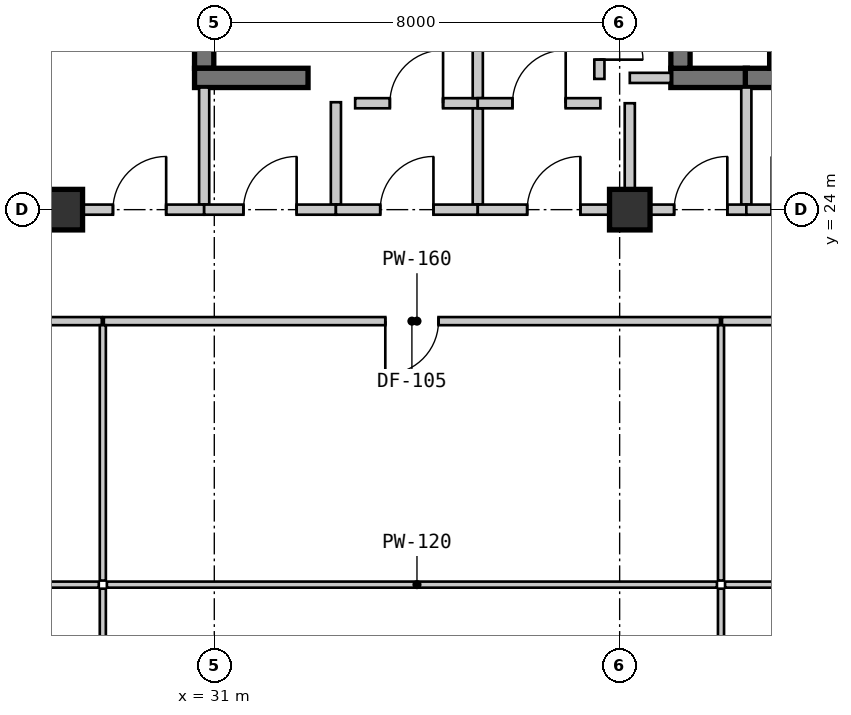
"""IFC4 building model, lengths in metres.
Left out: names, types, materials, properties, quantities, classifications, styles, units other than length and angle.
Written with IfcOpenShell. Run it as: python <this file> out.ifc"""

import sys

from ifc_helpers import new_model, si_unit, direction, frame, frame_2d, origin, origin_2d, place, context, subcontext, project, spatial, rectangle, extrude, source, transform, mapped, element, fill, save


model = new_model("IFC4")
c1 = context("Model", 3, precision=1e-05, world=origin(), true_north=direction((0.0, 1.0)))
c2 = subcontext(c1, "Body", "Model", "MODEL_VIEW")
j1 = project(units=[si_unit("LENGTHUNIT", "METRE"), si_unit("PLANEANGLEUNIT", "RADIAN")], contexts=[c1])
p1 = place(None, origin())
s1 = spatial("IfcSite", under=j1, at=p1, CompositionType="ELEMENT")
p2 = place(p1, origin())
s2 = spatial("IfcBuilding", under=s1, at=p2, CompositionType="ELEMENT")
p3 = place(p2, frame((0.0, 0.0, 45.15)))
s3 = spatial("IfcBuildingStorey", under=s2, at=p3, CompositionType="ELEMENT", Elevation=45.15)
m1 = source(origin(), c2, "Body", "SweptSolid", [
    extrude(rectangle(XDim=0.8, YDim=0.8, at=origin_2d()), origin(), (0.0, 0.0, 1.0), 3.15),
])
for number, where, z_axis, x_axis in (
    (1, (28.0, 24.0, 0.0), (0.0, 0.0, 1.0), (1.0, 0.0, 0.0)),
    (2, (39.2, 24.0, 0.0), (0.0, 0.0, 1.0), (1.0, 0.0, 0.0)),
):
    element("IfcColumn", number, at=place(p3, frame(where, z_axis=z_axis, x_axis=x_axis)), inside=s3, PredefinedType="COLUMN", context=c2, shape_type="MappedRepresentation", body=[
        mapped(m1, transform((0.0, 0.0, 0.0), scale=1.0)),
    ])
m2 = source(origin(), c2, "Body", "SweptSolid", [
    extrude(rectangle(XDim=1.22, YDim=0.38, at=frame_2d((0.61, 0.0))), origin(), (0.0, 0.0, 1.0), 2.93),
])
p4 = place(p3, frame((30.8, 28.01, 0.0), z_axis=(0.0, 0.0, 1.0), x_axis=(0.0, -1.0, 0.0)))
e3 = element("IfcWall", 3, at=p4, inside=s3, PredefinedType="SHEAR", context=c2, shape_type="MappedRepresentation", body=[
    mapped(m2, transform((0.0, 0.0, 0.0), scale=1.0)),
])
m3 = source(origin(), c2, "Body", "SweptSolid", [
    extrude(rectangle(XDim=2.24, YDim=0.38, at=frame_2d((1.12, 0.0))), origin(), (0.0, 0.0, 1.0), 2.93),
])
p5 = place(p3, frame((30.61, 26.6, 0.0), z_axis=(0.0, 0.0, 1.0), x_axis=(1.0, 0.0, 0.0)))
e4 = element("IfcWall", 4, at=p5, inside=s3, PredefinedType="SHEAR", context=c2, shape_type="MappedRepresentation", body=[
    mapped(m3, transform((0.0, 0.0, 0.0), scale=1.0)),
])
m4 = source(origin(), c2, "Body", "SweptSolid", [
    extrude(rectangle(XDim=1.51, YDim=0.38, at=frame_2d((0.755, 0.0))), origin(), (0.0, 0.0, 1.0), 2.93),
])
p6 = place(p3, frame((40.01, 26.6, 0.0), z_axis=(0.0, 0.0, 1.0), x_axis=(1.0, 0.0, 0.0)))
e5 = element("IfcWall", 5, at=p6, inside=s3, PredefinedType="SHEAR", context=c2, shape_type="MappedRepresentation", body=[
    mapped(m4, transform((0.0, 0.0, 0.0), scale=1.0)),
])
p7 = place(p3, frame((40.2, 28.01, 0.0), z_axis=(0.0, 0.0, 1.0), x_axis=(0.0, -1.0, 0.0)))
e6 = element("IfcWall", 6, at=p7, inside=s3, PredefinedType="SHEAR", context=c2, shape_type="MappedRepresentation", body=[
    mapped(m2, transform((0.0, 0.0, 0.0), scale=1.0)),
])
m5 = source(origin(), c2, "Body", "SweptSolid", [
    extrude(rectangle(XDim=0.86, YDim=0.38, at=frame_2d((0.43, 0.0))), origin(), (0.0, 0.0, 1.0), 2.93),
])
p8 = place(p3, frame((41.48, 26.6, 0.0), z_axis=(0.0, 0.0, 1.0), x_axis=(1.0, 0.0, 0.0)))
e7 = element("IfcWall", 7, at=p8, inside=s3, PredefinedType="SHEAR", context=c2, shape_type="MappedRepresentation", body=[
    mapped(m5, transform((0.0, 0.0, 0.0), scale=1.0)),
])
p9 = place(p3, frame((42.15, 26.79, 0.0), z_axis=(0.0, 0.0, 1.0), x_axis=(0.0, 1.0, 0.0)))
e8 = element("IfcWall", 8, at=p9, inside=s3, PredefinedType="SHEAR", context=c2, shape_type="MappedRepresentation", body=[
    mapped(m2, transform((0.0, 0.0, 0.0), scale=1.0)),
])
m6 = source(origin(), c2, "Body", "SweptSolid", [
    extrude(rectangle(XDim=2.31, YDim=0.2, at=frame_2d((1.155, 0.0))), origin(), (0.0, 0.0, 1.0), 2.93),
])
p10 = place(p3, frame((30.8, 26.41, 0.0), z_axis=(0.0, 0.0, 1.0), x_axis=(0.0, -1.0, 0.0)))
e9 = element("IfcWall", 9, at=p10, inside=s3, PredefinedType="SOLIDWALL", context=c2, shape_type="MappedRepresentation", body=[
    mapped(m6, transform((0.0, 0.0, 0.0), scale=1.0)),
])
m7 = source(origin(), c2, "Body", "SweptSolid", [
    extrude(rectangle(XDim=4.35, YDim=0.2, at=frame_2d((2.175, 0.0))), origin(), (0.0, 0.0, 1.0), 2.47),
])
p11 = place(p3, frame((30.8, 24.0, 0.0), z_axis=(0.0, 0.0, 1.0), x_axis=(-1.0, 0.0, 0.0)))
e10 = element("IfcWall", 10, at=p11, inside=s3, PredefinedType="SOLIDWALL", context=c2, shape_type="MappedRepresentation", body=[
    mapped(m7, transform((0.0, 0.0, 0.0), scale=1.0)),
])
m8 = source(origin(), c2, "Body", "SweptSolid", [
    extrude(rectangle(XDim=1.05, YDim=2.1, at=frame_2d((0.525, 1.05))), frame((0.0, 0.11, 0.0), z_axis=(0.0, -1.0, 0.0), x_axis=(1.0, 0.0, 0.0)), (0.0, 0.0, 1.0), 0.22),
])
p12 = place(p11, frame((0.75, 0.0, 0.0)))
e11 = element("IfcOpeningElement", 11, at=p12, cuts=e10, PredefinedType="OPENING", context=c2, shape_type="MappedRepresentation", body=[
    mapped(m8, transform((0.0, 0.0, 0.0), scale=1.0)),
])
m9 = source(origin(), c2, "Body", "SweptSolid", [
    extrude(rectangle(XDim=2.02, YDim=0.2, at=frame_2d((1.01, 0.0))), origin(), (0.0, 0.0, 1.0), 2.93),
])
p13 = place(p3, frame((33.4, 26.12, 0.0), z_axis=(0.0, 0.0, 1.0), x_axis=(0.0, -1.0, 0.0)))
e12 = element("IfcWall", 12, at=p13, inside=s3, PredefinedType="SOLIDWALL", context=c2, shape_type="MappedRepresentation", body=[
    mapped(m9, transform((0.0, 0.0, 0.0), scale=1.0)),
])
m10 = source(origin(), c2, "Body", "SweptSolid", [
    extrude(rectangle(XDim=2.6, YDim=0.2, at=frame_2d((1.3, 0.0))), origin(), (0.0, 0.0, 1.0), 2.47),
])
p14 = place(p3, frame((33.4, 24.0, 0.0), z_axis=(0.0, 0.0, 1.0), x_axis=(-1.0, 0.0, 0.0)))
e13 = element("IfcWall", 13, at=p14, inside=s3, PredefinedType="SOLIDWALL", context=c2, shape_type="MappedRepresentation", body=[
    mapped(m10, transform((0.0, 0.0, 0.0), scale=1.0)),
])
p15 = place(p14, frame((0.775, 0.0, 0.0)))
e14 = element("IfcOpeningElement", 14, at=p15, cuts=e13, PredefinedType="OPENING", context=c2, shape_type="MappedRepresentation", body=[
    mapped(m8, transform((0.0, 0.0, 0.0), scale=1.0)),
])
m11 = source(origin(), c2, "Body", "SweptSolid", [
    extrude(rectangle(XDim=2.42, YDim=0.2, at=frame_2d((1.21, 0.0))), origin(), (0.0, 0.0, 1.0), 2.93),
])
p16 = place(p3, frame((33.78, 26.1, 0.0), z_axis=(0.0, 0.0, 1.0), x_axis=(1.0, 0.0, 0.0)))
e15 = element("IfcWall", 15, at=p16, inside=s3, PredefinedType="SOLIDWALL", context=c2, shape_type="MappedRepresentation", body=[
    mapped(m11, transform((0.0, 0.0, 0.0), scale=1.0)),
])
p17 = place(p16, frame((0.685, 0.0, 0.0)))
e16 = element("IfcOpeningElement", 16, at=p17, cuts=e15, PredefinedType="OPENING", context=c2, shape_type="MappedRepresentation", body=[
    mapped(m8, transform((0.0, 0.0, 0.0), scale=1.0)),
])
m12 = source(origin(), c2, "Body", "SweptSolid", [
    extrude(rectangle(XDim=1.9, YDim=0.2, at=frame_2d((0.95, 0.0))), origin(), (0.0, 0.0, 1.0), 2.93),
])
p18 = place(p3, frame((36.2, 26.0, 0.0), z_axis=(0.0, 0.0, 1.0), x_axis=(0.0, -1.0, 0.0)))
e17 = element("IfcWall", 17, at=p18, inside=s3, PredefinedType="SOLIDWALL", context=c2, shape_type="MappedRepresentation", body=[
    mapped(m12, transform((0.0, 0.0, 0.0), scale=1.0)),
])
m13 = source(origin(), c2, "Body", "SweptSolid", [
    extrude(rectangle(XDim=2.8, YDim=0.2, at=frame_2d((1.4, 0.0))), origin(), (0.0, 0.0, 1.0), 2.47),
])
p19 = place(p3, frame((36.2, 24.0, 0.0), z_axis=(0.0, 0.0, 1.0), x_axis=(-1.0, 0.0, 0.0)))
e18 = element("IfcWall", 18, at=p19, inside=s3, PredefinedType="SOLIDWALL", context=c2, shape_type="MappedRepresentation", body=[
    mapped(m13, transform((0.0, 0.0, 0.0), scale=1.0)),
])
p20 = place(p19, frame((0.875, 0.0, 0.0)))
e19 = element("IfcOpeningElement", 19, at=p20, cuts=e18, PredefinedType="OPENING", context=c2, shape_type="MappedRepresentation", body=[
    mapped(m8, transform((0.0, 0.0, 0.0), scale=1.0)),
])
m14 = source(origin(), c2, "Body", "SweptSolid", [
    extrude(rectangle(XDim=1.9, YDim=0.2, at=frame_2d((0.95, 0.0))), origin(), (0.0, 0.0, 1.0), 2.93),
])
p21 = place(p3, frame((36.2, 28.1, 0.0), z_axis=(0.0, 0.0, 1.0), x_axis=(0.0, -1.0, 0.0)))
e20 = element("IfcWall", 20, at=p21, inside=s3, PredefinedType="SOLIDWALL", context=c2, shape_type="MappedRepresentation", body=[
    mapped(m14, transform((0.0, 0.0, 0.0), scale=1.0)),
])
m15 = source(origin(), c2, "Body", "SweptSolid", [
    extrude(rectangle(XDim=2.42, YDim=0.2, at=frame_2d((1.21, 0.0))), origin(), (0.0, 0.0, 1.0), 2.93),
])
p22 = place(p3, frame((36.2, 26.1, 0.0), z_axis=(0.0, 0.0, 1.0), x_axis=(1.0, 0.0, 0.0)))
e21 = element("IfcWall", 21, at=p22, inside=s3, PredefinedType="SOLIDWALL", context=c2, shape_type="MappedRepresentation", body=[
    mapped(m15, transform((0.0, 0.0, 0.0), scale=1.0)),
])
p23 = place(p22, frame((0.685, 0.0, 0.0)))
e22 = element("IfcOpeningElement", 22, at=p23, cuts=e21, PredefinedType="OPENING", context=c2, shape_type="MappedRepresentation", body=[
    mapped(m8, transform((0.0, 0.0, 0.0), scale=1.0)),
])
m16 = source(origin(), c2, "Body", "SweptSolid", [
    extrude(rectangle(XDim=2.0, YDim=0.2, at=frame_2d((1.0, 0.0))), origin(), (0.0, 0.0, 1.0), 2.47),
])
p24 = place(p3, frame((39.2, 26.1, 0.0), z_axis=(0.0, 0.0, 1.0), x_axis=(0.0, -1.0, 0.0)))
e23 = element("IfcWall", 23, at=p24, inside=s3, PredefinedType="SOLIDWALL", context=c2, shape_type="MappedRepresentation", body=[
    mapped(m16, transform((0.0, 0.0, 0.0), scale=1.0)),
])
m17 = source(origin(), c2, "Body", "SweptSolid", [
    extrude(rectangle(XDim=3.0, YDim=0.2, at=frame_2d((1.5, 0.0))), origin(), (0.0, 0.0, 1.0), 2.47),
])
p25 = place(p3, frame((39.2, 24.0, 0.0), z_axis=(0.0, 0.0, 1.0), x_axis=(-1.0, 0.0, 0.0)))
e24 = element("IfcWall", 24, at=p25, inside=s3, PredefinedType="SOLIDWALL", context=c2, shape_type="MappedRepresentation", body=[
    mapped(m17, transform((0.0, 0.0, 0.0), scale=1.0)),
])
p26 = place(p25, frame((0.975, 0.0, 0.0)))
e25 = element("IfcOpeningElement", 25, at=p26, cuts=e24, PredefinedType="OPENING", context=c2, shape_type="MappedRepresentation", body=[
    mapped(m8, transform((0.0, 0.0, 0.0), scale=1.0)),
])
m18 = source(origin(), c2, "Body", "SweptSolid", [
    extrude(rectangle(XDim=1.43, YDim=0.2, at=frame_2d((0.715, 0.0))), origin(), (0.0, 0.0, 1.0), 2.93),
])
p27 = place(p3, frame((38.6, 28.01, 0.0), z_axis=(0.0, 0.0, 1.0), x_axis=(0.0, -1.0, 0.0)))
e26 = element("IfcWall", 26, at=p27, inside=s3, PredefinedType="SOLIDWALL", context=c2, shape_type="MappedRepresentation", body=[
    mapped(m18, transform((0.0, 0.0, 0.0), scale=1.0)),
])
m19 = source(origin(), c2, "Body", "SweptSolid", [
    extrude(rectangle(XDim=0.86, YDim=2.1, at=frame_2d((0.43, 1.05))), frame((0.0, 0.11, 0.0), z_axis=(0.0, -1.0, 0.0), x_axis=(1.0, 0.0, 0.0)), (0.0, 0.0, 1.0), 0.22),
])
p28 = place(p27, frame((0.19, 0.0, 0.0)))
e27 = element("IfcOpeningElement", 27, at=p28, cuts=e26, PredefinedType="OPENING", context=c2, shape_type="MappedRepresentation", body=[
    mapped(m19, transform((0.0, 0.0, 0.0), scale=1.0)),
])
m20 = source(origin(), c2, "Body", "SweptSolid", [
    extrude(rectangle(XDim=0.81, YDim=0.2, at=frame_2d((0.405, 0.0))), origin(), (0.0, 0.0, 1.0), 2.93),
])
p29 = place(p3, frame((39.2, 26.6, 0.0), z_axis=(0.0, 0.0, 1.0), x_axis=(1.0, 0.0, 0.0)))
e28 = element("IfcWall", 28, at=p29, inside=s3, PredefinedType="SOLIDWALL", context=c2, shape_type="MappedRepresentation", body=[
    mapped(m20, transform((0.0, 0.0, 0.0), scale=1.0)),
])
p30 = place(p3, frame((41.5, 26.41, 0.0), z_axis=(0.0, 0.0, 1.0), x_axis=(0.0, -1.0, 0.0)))
e29 = element("IfcWall", 29, at=p30, inside=s3, PredefinedType="SOLIDWALL", context=c2, shape_type="MappedRepresentation", body=[
    mapped(m6, transform((0.0, 0.0, 0.0), scale=1.0)),
])
m21 = source(origin(), c2, "Body", "SweptSolid", [
    extrude(rectangle(XDim=2.3, YDim=0.2, at=frame_2d((1.15, 0.0))), origin(), (0.0, 0.0, 1.0), 2.397),
])
p31 = place(p3, frame((41.5, 24.0, 0.0), z_axis=(0.0, 0.0, 1.0), x_axis=(-1.0, 0.0, 0.0)))
e30 = element("IfcWall", 30, at=p31, inside=s3, PredefinedType="SOLIDWALL", context=c2, shape_type="MappedRepresentation", body=[
    mapped(m21, transform((0.0, 0.0, 0.0), scale=1.0)),
])
p32 = place(p31, frame((0.375, 0.0, 0.0)))
e31 = element("IfcOpeningElement", 31, at=p32, cuts=e30, PredefinedType="OPENING", context=c2, shape_type="MappedRepresentation", body=[
    mapped(m8, transform((0.0, 0.0, 0.0), scale=1.0)),
])
m22 = source(origin(), c2, "Body", "SweptSolid", [
    extrude(rectangle(XDim=2.05, YDim=0.2, at=frame_2d((1.025, 0.0))), origin(), (0.0, 0.0, 1.0), 2.397),
])
p33 = place(p3, frame((43.55, 24.0, 0.0), z_axis=(0.0, 0.0, 1.0), x_axis=(-1.0, 0.0, 0.0)))
e32 = element("IfcWall", 32, at=p33, inside=s3, PredefinedType="SOLIDWALL", context=c2, shape_type="MappedRepresentation", body=[
    mapped(m22, transform((0.0, 0.0, 0.0), scale=1.0)),
])
p34 = place(p33, frame((0.5, 0.0, 0.0)))
e33 = element("IfcOpeningElement", 33, at=p34, cuts=e32, PredefinedType="OPENING", context=c2, shape_type="MappedRepresentation", body=[
    mapped(m8, transform((0.0, 0.0, 0.0), scale=1.0)),
])
m23 = source(origin(), c2, "Body", "SweptSolid", [
    extrude(rectangle(XDim=11.959, YDim=0.16, at=frame_2d((5.98, 0.0))), origin(), (0.0, 0.0, 1.0), 2.93),
])
p35 = place(p3, frame((28.78, 21.8, 0.0), z_axis=(0.0, 0.0, 1.0), x_axis=(-1.0, 0.0, 0.0)))
e34 = element("IfcWall", 34, at=p35, inside=s3, PredefinedType="PARTITIONING", context=c2, shape_type="MappedRepresentation", body=[
    mapped(m23, transform((0.0, 0.0, 0.0), scale=1.0)),
])
m24 = source(origin(), c2, "Body", "SweptSolid", [
    extrude(rectangle(XDim=1.05, YDim=2.1, at=frame_2d((0.525, 1.05))), frame((0.0, 0.09, 0.0), z_axis=(0.0, -1.0, 0.0), x_axis=(1.0, 0.0, 0.0)), (0.0, 0.0, 1.0), 0.18),
])
p36 = place(p35, frame((5.455, 0.0, 0.0)))
e35 = element("IfcOpeningElement", 35, at=p36, cuts=e34, PredefinedType="OPENING", context=c2, shape_type="MappedRepresentation", body=[
    mapped(m24, transform((0.0, 0.0, 0.0), scale=1.0)),
])
m25 = source(origin(), c2, "Body", "SweptSolid", [
    extrude(rectangle(XDim=12.159, YDim=0.16, at=frame_2d((6.08, 0.0))), origin(), (0.0, 0.0, 1.0), 2.93),
])
p37 = place(p3, frame((40.98, 21.8, 0.0), z_axis=(0.0, 0.0, 1.0), x_axis=(-1.0, 0.0, 0.0)))
e36 = element("IfcWall", 36, at=p37, inside=s3, PredefinedType="PARTITIONING", context=c2, shape_type="MappedRepresentation", body=[
    mapped(m25, transform((0.0, 0.0, 0.0), scale=1.0)),
])
p38 = place(p37, frame((5.555, 0.0, 0.0)))
e37 = element("IfcOpeningElement", 37, at=p38, cuts=e36, PredefinedType="OPENING", context=c2, shape_type="MappedRepresentation", body=[
    mapped(m24, transform((0.0, 0.0, 0.0), scale=1.0)),
])
p39 = place(p3, frame((53.18, 21.8, 0.0), z_axis=(0.0, 0.0, 1.0), x_axis=(-1.0, 0.0, 0.0)))
e38 = element("IfcWall", 38, at=p39, inside=s3, PredefinedType="PARTITIONING", context=c2, shape_type="MappedRepresentation", body=[
    mapped(m25, transform((0.0, 0.0, 0.0), scale=1.0)),
])
p40 = place(p39, frame((5.555, 0.0, 0.0)))
e39 = element("IfcOpeningElement", 39, at=p40, cuts=e38, PredefinedType="OPENING", context=c2, shape_type="MappedRepresentation", body=[
    mapped(m24, transform((0.0, 0.0, 0.0), scale=1.0)),
])
m26 = source(origin(), c2, "Body", "SweptSolid", [
    extrude(rectangle(XDim=11.84, YDim=0.12, at=frame_2d((5.92, 0.0))), origin(), (0.0, 0.0, 1.0), 2.93),
])
p41 = place(p3, frame((16.88, 16.6, 0.0), z_axis=(0.0, 0.0, 1.0), x_axis=(1.0, 0.0, 0.0)))
e40 = element("IfcWall", 40, at=p41, inside=s3, PredefinedType="PARTITIONING", context=c2, shape_type="MappedRepresentation", body=[
    mapped(m26, transform((0.0, 0.0, 0.0), scale=1.0)),
])
m27 = source(origin(), c2, "Body", "SweptSolid", [
    extrude(rectangle(XDim=5.04, YDim=0.12, at=frame_2d((2.52, 0.0))), origin(), (0.0, 0.0, 1.0), 2.93),
])
for number, where, z_axis, x_axis in (
    (41, (28.8, 16.52, 0.0), (0.0, 0.0, 1.0), (0.0, -1.0, 0.0)),
    (42, (28.8, 21.72, 0.0), (0.0, 0.0, 1.0), (0.0, -1.0, 0.0)),
):
    element("IfcWall", number, at=place(p3, frame(where, z_axis=z_axis, x_axis=x_axis)), inside=s3, PredefinedType="PARTITIONING", context=c2, shape_type="MappedRepresentation", body=[
        mapped(m27, transform((0.0, 0.0, 0.0), scale=1.0)),
    ])
m28 = source(origin(), c2, "Body", "SweptSolid", [
    extrude(rectangle(XDim=12.04, YDim=0.12, at=frame_2d((6.02, 0.0))), origin(), (0.0, 0.0, 1.0), 2.93),
])
p42 = place(p3, frame((28.88, 16.6, 0.0), z_axis=(0.0, 0.0, 1.0), x_axis=(1.0, 0.0, 0.0)))
e43 = element("IfcWall", 43, at=p42, inside=s3, PredefinedType="PARTITIONING", context=c2, shape_type="MappedRepresentation", body=[
    mapped(m28, transform((0.0, 0.0, 0.0), scale=1.0)),
])
m29 = source(origin(), c2, "Body", "SweptSolid", [
    extrude(rectangle(XDim=1.104, YDim=0.12, at=frame_2d((0.552, 0.0))), origin(), (0.0, 0.0, 1.0), 2.93),
])
p43 = place(p3, frame((41.0, 16.52, 0.0), z_axis=(0.0, 0.0, 1.0), x_axis=(0.0, -1.0, 0.0)))
e44 = element("IfcWall", 44, at=p43, inside=s3, PredefinedType="PARTITIONING", context=c2, shape_type="MappedRepresentation", body=[
    mapped(m29, transform((0.0, 0.0, 0.0), scale=1.0)),
])
p44 = place(p3, frame((41.0, 21.72, 0.0), z_axis=(0.0, 0.0, 1.0), x_axis=(0.0, -1.0, 0.0)))
e45 = element("IfcWall", 45, at=p44, inside=s3, PredefinedType="PARTITIONING", context=c2, shape_type="MappedRepresentation", body=[
    mapped(m27, transform((0.0, 0.0, 0.0), scale=1.0)),
])
p45 = place(p3, frame((41.08, 16.6, 0.0), z_axis=(0.0, 0.0, 1.0), x_axis=(1.0, 0.0, 0.0)))
e46 = element("IfcWall", 46, at=p45, inside=s3, PredefinedType="PARTITIONING", context=c2, shape_type="MappedRepresentation", body=[
    mapped(m28, transform((0.0, 0.0, 0.0), scale=1.0)),
])
m30 = source(origin(), c2, "Body", "SweptSolid", [
    extrude(rectangle(XDim=1.05, YDim=2.1, at=frame_2d((0.525, 1.05))), frame((0.0, 0.025, 0.0), z_axis=(0.0, -1.0, 0.0), x_axis=(1.0, 0.0, 0.0)), (0.0, 0.0, 1.0), 0.05),
])
p46 = place(p12, frame((1.05, 0.0, 0.0), z_axis=(0.0, 0.0, 1.0), x_axis=(-1.0, 0.0, 0.0)))
e47 = element("IfcDoor", 47, at=p46, inside=s3, OperationType="SINGLE_SWING_RIGHT", PredefinedType="DOOR", context=c2, shape_type="MappedRepresentation", body=[
    mapped(m30, transform((0.0, 0.0, 0.0), scale=1.0)),
])
fill(e11, e47)
p47 = place(p15, frame((1.05, 0.0, 0.0), z_axis=(0.0, 0.0, 1.0), x_axis=(-1.0, 0.0, 0.0)))
e48 = element("IfcDoor", 48, at=p47, inside=s3, OperationType="SINGLE_SWING_RIGHT", PredefinedType="DOOR", context=c2, shape_type="MappedRepresentation", body=[
    mapped(m30, transform((0.0, 0.0, 0.0), scale=1.0)),
])
fill(e14, e48)
p48 = place(p17, origin())
e49 = element("IfcDoor", 49, at=p48, inside=s3, OperationType="SINGLE_SWING_RIGHT", PredefinedType="DOOR", context=c2, shape_type="MappedRepresentation", body=[
    mapped(m30, transform((0.0, 0.0, 0.0), scale=1.0)),
])
fill(e16, e49)
p49 = place(p20, frame((1.05, 0.0, 0.0), z_axis=(0.0, 0.0, 1.0), x_axis=(-1.0, 0.0, 0.0)))
e50 = element("IfcDoor", 50, at=p49, inside=s3, OperationType="SINGLE_SWING_RIGHT", PredefinedType="DOOR", context=c2, shape_type="MappedRepresentation", body=[
    mapped(m30, transform((0.0, 0.0, 0.0), scale=1.0)),
])
fill(e19, e50)
p50 = place(p23, origin())
e51 = element("IfcDoor", 51, at=p50, inside=s3, OperationType="SINGLE_SWING_RIGHT", PredefinedType="DOOR", context=c2, shape_type="MappedRepresentation", body=[
    mapped(m30, transform((0.0, 0.0, 0.0), scale=1.0)),
])
fill(e22, e51)
p51 = place(p26, frame((1.05, 0.0, 0.0), z_axis=(0.0, 0.0, 1.0), x_axis=(-1.0, 0.0, 0.0)))
e52 = element("IfcDoor", 52, at=p51, inside=s3, OperationType="SINGLE_SWING_RIGHT", PredefinedType="DOOR", context=c2, shape_type="MappedRepresentation", body=[
    mapped(m30, transform((0.0, 0.0, 0.0), scale=1.0)),
])
fill(e25, e52)
p52 = place(p32, frame((1.05, 0.0, 0.0), z_axis=(0.0, 0.0, 1.0), x_axis=(-1.0, 0.0, 0.0)))
e53 = element("IfcDoor", 53, at=p52, inside=s3, OperationType="SINGLE_SWING_RIGHT", PredefinedType="DOOR", context=c2, shape_type="MappedRepresentation", body=[
    mapped(m30, transform((0.0, 0.0, 0.0), scale=1.0)),
])
fill(e31, e53)
p53 = place(p34, frame((1.05, 0.0, 0.0), z_axis=(0.0, 0.0, 1.0), x_axis=(-1.0, 0.0, 0.0)))
e54 = element("IfcDoor", 54, at=p53, inside=s3, OperationType="SINGLE_SWING_LEFT", PredefinedType="DOOR", context=c2, shape_type="MappedRepresentation", body=[
    mapped(m30, transform((0.0, 0.0, 0.0), scale=1.0)),
])
fill(e33, e54)
p54 = place(p38, origin())
e55 = element("IfcDoor", 55, at=p54, inside=s3, OperationType="SINGLE_SWING_RIGHT", PredefinedType="DOOR", context=c2, shape_type="MappedRepresentation", body=[
    mapped(m30, transform((0.0, 0.0, 0.0), scale=1.0)),
])
fill(e37, e55)
m31 = source(origin(), c2, "Body", "SweptSolid", [
    extrude(rectangle(XDim=0.86, YDim=2.1, at=frame_2d((0.43, 1.05))), frame((0.0, 0.025, 0.0), z_axis=(0.0, -1.0, 0.0), x_axis=(1.0, 0.0, 0.0)), (0.0, 0.0, 1.0), 0.05),
])
p55 = place(p28, origin())
e56 = element("IfcDoor", 56, at=p55, inside=s3, OperationType="SINGLE_SWING_RIGHT", PredefinedType="DOOR", context=c2, shape_type="MappedRepresentation", body=[
    mapped(m31, transform((0.0, 0.0, 0.0), scale=1.0)),
])
fill(e27, e56)
save(model, sys.argv[1])
